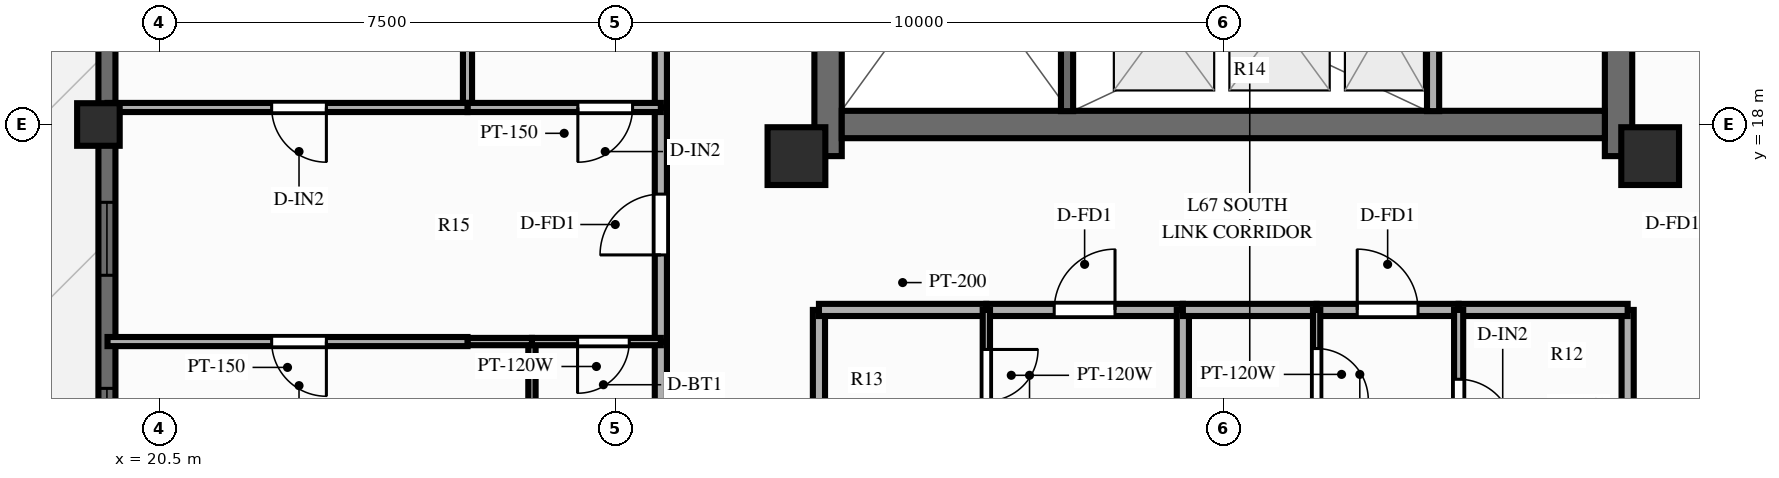
"""IFC4 building model, lengths in metres.
Left out: names, types, materials, properties, quantities, classifications, styles, units other than length and angle.
Written with IfcOpenShell. Run it as: python <this file> out.ifc"""

import sys

from ifc_helpers import new_model, si_unit, direction, frame, frame_2d, origin, origin_2d, place, context, subcontext, project, spatial, rectangle, extrude, source, transform, mapped, element, fill, save


model = new_model("IFC4")
c1 = context("Model", 3, precision=1e-05, world=origin(), true_north=direction((0.0, 1.0)))
c2 = subcontext(c1, "Body", "Model", "MODEL_VIEW")
j1 = project(units=[si_unit("LENGTHUNIT", "METRE"), si_unit("PLANEANGLEUNIT", "RADIAN")], contexts=[c1])
p1 = place(None, origin())
s1 = spatial("IfcSite", under=j1, at=p1, CompositionType="ELEMENT")
p2 = place(p1, origin())
s2 = spatial("IfcBuilding", under=s1, at=p2, CompositionType="ELEMENT")
p3 = place(p2, frame((0.0, 0.0, 216.3)))
s3 = spatial("IfcBuildingStorey", under=s2, at=p3, CompositionType="ELEMENT", Elevation=216.3)
p4 = place(p3, frame((31.5, 17.48, 0.0), z_axis=(0.0, 0.0, 1.0), x_axis=(0.0, 1.0, 0.0)))
e1 = element("IfcWall", 1, at=p4, inside=s3, PredefinedType="SHEAR", context=c2, shape_type="SweptSolid", body=[
    extrude(rectangle(XDim=19.04, YDim=0.45, at=frame_2d((9.52, 0.0))), origin(), (0.0, 0.0, 1.0), 3.9),
])
p5 = place(p4, frame((6.32, 0.0, 0.0)))
e2 = element("IfcOpeningElement", 2, at=p5, cuts=e1, PredefinedType="OPENING", context=c2, shape_type="SweptSolid", body=[
    extrude(rectangle(XDim=1.1, YDim=2.15, at=frame_2d((0.55, 1.075))), frame((0.0, 0.237, 0.0), z_axis=(0.0, -1.0, 0.0), x_axis=(1.0, 0.0, 0.0)), (0.0, 0.0, 1.0), 0.474),
])
p6 = place(p3, frame((44.5, 17.48, 0.0), z_axis=(0.0, 0.0, 1.0), x_axis=(0.0, 1.0, 0.0)))
e3 = element("IfcWall", 3, at=p6, inside=s3, PredefinedType="SHEAR", context=c2, shape_type="SweptSolid", body=[
    extrude(rectangle(XDim=19.04, YDim=0.45, at=frame_2d((9.52, 0.0))), origin(), (0.0, 0.0, 1.0), 3.9),
])
p7 = place(p6, frame((12.67, 0.0, 0.0), z_axis=(0.0, 0.0, 1.0), x_axis=(-1.0, 0.0, 0.0)))
e4 = element("IfcOpeningElement", 4, at=p7, cuts=e3, PredefinedType="OPENING", context=c2, shape_type="SweptSolid", body=[
    extrude(rectangle(XDim=1.1, YDim=2.15, at=frame_2d((0.55, 1.075))), frame((0.0, 0.237, 0.0), z_axis=(0.0, -1.0, 0.0), x_axis=(1.0, 0.0, 0.0)), (0.0, 0.0, 1.0), 0.474),
])
p8 = place(p3, frame((31.725, 18.0, 0.0), z_axis=(0.0, 0.0, 1.0), x_axis=(1.0, 0.0, 0.0)))
e5 = element("IfcWall", 5, at=p8, inside=s3, PredefinedType="SHEAR", context=c2, shape_type="SweptSolid", body=[
    extrude(rectangle(XDim=12.55, YDim=0.45, at=frame_2d((6.275, 0.0))), origin(), (0.0, 0.0, 1.0), 3.9),
])
m1 = source(origin(), c2, "Body", "SweptSolid", [
    extrude(rectangle(XDim=0.95, YDim=0.95, at=origin_2d()), origin(), (0.0, 0.0, 1.0), 3.9),
])
for number, where, z_axis, x_axis in (
    (6, (30.98, 17.48, 0.0), (0.0, 0.0, 1.0), (1.0, 0.0, 0.0)),
    (7, (45.02, 17.48, 0.0), (0.0, 0.0, 1.0), (1.0, 0.0, 0.0)),
):
    element("IfcColumn", number, at=place(p3, frame(where, z_axis=z_axis, x_axis=x_axis)), inside=s3, PredefinedType="COLUMN", context=c2, shape_type="MappedRepresentation", body=[
        mapped(m1, transform((0.0, 0.0, 0.0), scale=1.0)),
    ])
m2 = source(origin(), c2, "Body", "SweptSolid", [
    extrude(rectangle(XDim=0.7, YDim=0.7, at=origin_2d()), origin(), (0.0, 0.0, 1.0), 3.9),
])
p9 = place(p3, frame((19.5, 18.0, 0.0), z_axis=(0.0, 0.0, 1.0), x_axis=(1.0, 0.0, 0.0)))
e8 = element("IfcColumn", 8, at=p9, inside=s3, PredefinedType="COLUMN", context=c2, shape_type="MappedRepresentation", body=[
    mapped(m2, transform((0.0, 0.0, 0.0), scale=1.0)),
])
p10 = place(p3, frame((19.64, 11.5, 0.0), z_axis=(0.0, 0.0, 1.0), x_axis=(0.0, 1.0, 0.0)))
e9 = element("IfcWall", 9, at=p10, inside=s3, PredefinedType="SOLIDWALL", context=c2, shape_type="SweptSolid", body=[
    extrude(rectangle(XDim=31.0, YDim=0.28, at=frame_2d((15.5, 0.0))), origin(), (0.0, 0.0, 1.0), 2.44),
])
p11 = place(p10, frame((0.96, 0.0, 0.25)))
e10 = element("IfcOpeningElement", 10, at=p11, cuts=e9, PredefinedType="OPENING", context=c2, shape_type="SweptSolid", body=[
    extrude(rectangle(XDim=1.2, YDim=1.5, at=frame_2d((0.6, 0.75))), frame((0.0, 0.152, 0.0), z_axis=(0.0, -1.0, 0.0), x_axis=(1.0, 0.0, 0.0)), (0.0, 0.0, 1.0), 0.304),
])
p12 = place(p10, frame((4.02, 0.0, 0.25)))
e11 = element("IfcOpeningElement", 11, at=p12, cuts=e9, PredefinedType="OPENING", context=c2, shape_type="SweptSolid", body=[
    extrude(rectangle(XDim=1.2, YDim=1.5, at=frame_2d((0.6, 0.75))), frame((0.0, 0.152, 0.0), z_axis=(0.0, -1.0, 0.0), x_axis=(1.0, 0.0, 0.0)), (0.0, 0.0, 1.0), 0.304),
])
p13 = place(p10, frame((8.089, 0.0, 0.25)))
e12 = element("IfcOpeningElement", 12, at=p13, cuts=e9, PredefinedType="OPENING", context=c2, shape_type="SweptSolid", body=[
    extrude(rectangle(XDim=1.2, YDim=1.5, at=frame_2d((0.6, 0.75))), frame((0.0, 0.152, 0.0), z_axis=(0.0, -1.0, 0.0), x_axis=(1.0, 0.0, 0.0)), (0.0, 0.0, 1.0), 0.304),
])
p14 = place(p10, frame((11.373, 0.0, 0.25)))
e13 = element("IfcOpeningElement", 13, at=p14, cuts=e9, PredefinedType="OPENING", context=c2, shape_type="SweptSolid", body=[
    extrude(rectangle(XDim=1.2, YDim=1.5, at=frame_2d((0.6, 0.75))), frame((0.0, 0.152, 0.0), z_axis=(0.0, -1.0, 0.0), x_axis=(1.0, 0.0, 0.0)), (0.0, 0.0, 1.0), 0.304),
])
p15 = place(p10, frame((14.307, 0.0, 0.0)))
e14 = element("IfcOpeningElement", 14, at=p15, cuts=e9, PredefinedType="OPENING", context=c2, shape_type="SweptSolid", body=[
    extrude(rectangle(XDim=1.6, YDim=2.15, at=frame_2d((0.8, 1.075))), frame((0.0, 0.152, 0.0), z_axis=(0.0, -1.0, 0.0), x_axis=(1.0, 0.0, 0.0)), (0.0, 0.0, 1.0), 0.304),
])
p16 = place(p10, frame((18.188, 0.0, 0.25)))
e15 = element("IfcOpeningElement", 15, at=p16, cuts=e9, PredefinedType="OPENING", context=c2, shape_type="SweptSolid", body=[
    extrude(rectangle(XDim=1.2, YDim=1.5, at=frame_2d((0.6, 0.75))), frame((0.0, 0.152, 0.0), z_axis=(0.0, -1.0, 0.0), x_axis=(1.0, 0.0, 0.0)), (0.0, 0.0, 1.0), 0.304),
])
p17 = place(p10, frame((21.484, 0.0, 0.25)))
e16 = element("IfcOpeningElement", 16, at=p17, cuts=e9, PredefinedType="OPENING", context=c2, shape_type="SweptSolid", body=[
    extrude(rectangle(XDim=1.2, YDim=1.5, at=frame_2d((0.6, 0.75))), frame((0.0, 0.152, 0.0), z_axis=(0.0, -1.0, 0.0), x_axis=(1.0, 0.0, 0.0)), (0.0, 0.0, 1.0), 0.304),
])
p18 = place(p10, frame((25.234, 0.0, 0.25)))
e17 = element("IfcOpeningElement", 17, at=p18, cuts=e9, PredefinedType="OPENING", context=c2, shape_type="SweptSolid", body=[
    extrude(rectangle(XDim=1.2, YDim=1.5, at=frame_2d((0.6, 0.75))), frame((0.0, 0.152, 0.0), z_axis=(0.0, -1.0, 0.0), x_axis=(1.0, 0.0, 0.0)), (0.0, 0.0, 1.0), 0.304),
])
p19 = place(p10, frame((28.294, 0.0, 0.25)))
e18 = element("IfcOpeningElement", 18, at=p19, cuts=e9, PredefinedType="OPENING", context=c2, shape_type="SweptSolid", body=[
    extrude(rectangle(XDim=1.2, YDim=1.5, at=frame_2d((0.6, 0.75))), frame((0.0, 0.152, 0.0), z_axis=(0.0, -1.0, 0.0), x_axis=(1.0, 0.0, 0.0)), (0.0, 0.0, 1.0), 0.304),
])
p20 = place(p3, frame((41.45, 18.22, 0.0), z_axis=(0.0, 0.0, 1.0), x_axis=(0.0, 1.0, 0.0)))
e19 = element("IfcWall", 19, at=p20, inside=s3, PredefinedType="PARTITIONING", context=c2, shape_type="SweptSolid", body=[
    extrude(rectangle(XDim=2.86, YDim=0.2, at=frame_2d((1.43, 0.0))), origin(), (0.0, 0.0, 1.0), 3.56),
])
p21 = place(p3, frame((35.43, 18.22, 0.0), z_axis=(0.0, 0.0, 1.0), x_axis=(0.0, 1.0, 0.0)))
e20 = element("IfcWall", 20, at=p21, inside=s3, PredefinedType="SOLIDWALL", context=c2, shape_type="SweptSolid", body=[
    extrude(rectangle(XDim=7.22, YDim=0.2, at=frame_2d((3.61, 0.0))), origin(), (0.0, 0.0, 1.0), 3.69),
])
p22 = place(p21, frame((6.68, 0.0, 0.0), z_axis=(0.0, 0.0, 1.0), x_axis=(-1.0, 0.0, 0.0)))
e21 = element("IfcOpeningElement", 21, at=p22, cuts=e20, PredefinedType="OPENING", context=c2, shape_type="SweptSolid", body=[
    extrude(rectangle(XDim=1.1, YDim=2.15, at=frame_2d((0.55, 1.075))), frame((0.0, 0.112, 0.0), z_axis=(0.0, -1.0, 0.0), x_axis=(1.0, 0.0, 0.0)), (0.0, 0.0, 1.0), 0.224),
])
for number, where, z_axis, x_axis in (
    (22, (31.35, 14.95, 0.0), (0.0, 0.0, 1.0), (0.0, -1.0, 0.0)),
    (23, (44.65, 14.95, 0.0), (0.0, 0.0, 1.0), (0.0, -1.0, 0.0)),
):
    element("IfcWall", number, at=place(p3, frame(where, z_axis=z_axis, x_axis=x_axis)), inside=s3, PredefinedType="PARTITIONING", context=c2, shape_type="SweptSolid", body=[
        extrude(rectangle(XDim=8.8, YDim=0.2, at=frame_2d((4.4, 0.0))), origin(), (0.0, 0.0, 1.0), 2.44),
    ])
p23 = place(p3, frame((31.35, 14.95, 0.0), z_axis=(0.0, 0.0, 1.0), x_axis=(1.0, 0.0, 0.0)))
e24 = element("IfcWall", 24, at=p23, inside=s3, PredefinedType="PARTITIONING", context=c2, shape_type="SweptSolid", body=[
    extrude(rectangle(XDim=2.753, YDim=0.2, at=frame_2d((1.376, 0.0))), origin(), (0.0, 0.0, 1.0), 3.56),
])
p24 = place(p3, frame((34.103, 14.95, 0.0), z_axis=(0.0, 0.0, 1.0), x_axis=(1.0, 0.0, 0.0)))
e25 = element("IfcWall", 25, at=p24, inside=s3, PredefinedType="PARTITIONING", context=c2, shape_type="SweptSolid", body=[
    extrude(rectangle(XDim=3.232, YDim=0.2, at=frame_2d((1.616, 0.0))), origin(), (0.0, 0.0, 1.0), 3.56),
])
p25 = place(p24, frame((1.116, 0.0, 0.0)))
e26 = element("IfcOpeningElement", 26, at=p25, cuts=e25, PredefinedType="OPENING", context=c2, shape_type="SweptSolid", body=[
    extrude(rectangle(XDim=1.0, YDim=2.15, at=frame_2d((0.5, 1.075))), frame((0.0, 0.112, 0.0), z_axis=(0.0, -1.0, 0.0), x_axis=(1.0, 0.0, 0.0)), (0.0, 0.0, 1.0), 0.224),
])
p26 = place(p3, frame((34.103, 14.95, 0.0), z_axis=(0.0, 0.0, 1.0), x_axis=(0.0, -1.0, 0.0)))
e27 = element("IfcWall", 27, at=p26, inside=s3, PredefinedType="PARTITIONING", context=c2, shape_type="SweptSolid", body=[
    extrude(rectangle(XDim=2.15, YDim=0.12, at=frame_2d((1.075, 0.0))), origin(), (0.0, 0.0, 1.0), 3.56),
])
p27 = place(p26, frame((0.65, 0.0, 0.0)))
e28 = element("IfcOpeningElement", 28, at=p27, cuts=e27, PredefinedType="OPENING", context=c2, shape_type="SweptSolid", body=[
    extrude(rectangle(XDim=0.85, YDim=2.05, at=frame_2d((0.425, 1.025))), frame((0.0, 0.072, 0.0), z_axis=(0.0, -1.0, 0.0), x_axis=(1.0, 0.0, 0.0)), (0.0, 0.0, 1.0), 0.144),
])
p28 = place(p3, frame((37.335, 14.95, 0.0), z_axis=(0.0, 0.0, 1.0), x_axis=(0.0, -1.0, 0.0)))
e29 = element("IfcWall", 29, at=p28, inside=s3, PredefinedType="PARTITIONING", context=c2, shape_type="SweptSolid", body=[
    extrude(rectangle(XDim=8.8, YDim=0.2, at=frame_2d((4.4, 0.0))), origin(), (0.0, 0.0, 1.0), 3.56),
])
p29 = place(p3, frame((37.335, 14.95, 0.0), z_axis=(0.0, 0.0, 1.0), x_axis=(1.0, 0.0, 0.0)))
e30 = element("IfcWall", 30, at=p29, inside=s3, PredefinedType="PARTITIONING", context=c2, shape_type="SweptSolid", body=[
    extrude(rectangle(XDim=2.2, YDim=0.2, at=frame_2d((1.1, 0.0))), origin(), (0.0, 0.0, 1.0), 3.56),
])
p30 = place(p3, frame((39.535, 14.95, 0.0), z_axis=(0.0, 0.0, 1.0), x_axis=(1.0, 0.0, 0.0)))
e31 = element("IfcWall", 31, at=p30, inside=s3, PredefinedType="PARTITIONING", context=c2, shape_type="SweptSolid", body=[
    extrude(rectangle(XDim=2.335, YDim=0.2, at=frame_2d((1.168, 0.0))), origin(), (0.0, 0.0, 1.0), 3.56),
])
p31 = place(p30, frame((0.668, 0.0, 0.0)))
e32 = element("IfcOpeningElement", 32, at=p31, cuts=e31, PredefinedType="OPENING", context=c2, shape_type="SweptSolid", body=[
    extrude(rectangle(XDim=1.0, YDim=2.15, at=frame_2d((0.5, 1.075))), frame((0.0, 0.112, 0.0), z_axis=(0.0, -1.0, 0.0), x_axis=(1.0, 0.0, 0.0)), (0.0, 0.0, 1.0), 0.224),
])
p32 = place(p3, frame((41.87, 14.95, 0.0), z_axis=(0.0, 0.0, 1.0), x_axis=(1.0, 0.0, 0.0)))
e33 = element("IfcWall", 33, at=p32, inside=s3, PredefinedType="PARTITIONING", context=c2, shape_type="SweptSolid", body=[
    extrude(rectangle(XDim=2.78, YDim=0.2, at=frame_2d((1.39, 0.0))), origin(), (0.0, 0.0, 1.0), 3.56),
])
p33 = place(p3, frame((39.535, 14.95, 0.0), z_axis=(0.0, 0.0, 1.0), x_axis=(0.0, -1.0, 0.0)))
e34 = element("IfcWall", 34, at=p33, inside=s3, PredefinedType="PARTITIONING", context=c2, shape_type="SweptSolid", body=[
    extrude(rectangle(XDim=2.12, YDim=0.12, at=frame_2d((1.06, 0.0))), origin(), (0.0, 0.0, 1.0), 3.56),
])
p34 = place(p33, frame((0.635, 0.0, 0.0)))
e35 = element("IfcOpeningElement", 35, at=p34, cuts=e34, PredefinedType="OPENING", context=c2, shape_type="SweptSolid", body=[
    extrude(rectangle(XDim=0.85, YDim=2.05, at=frame_2d((0.425, 1.025))), frame((0.0, 0.072, 0.0), z_axis=(0.0, -1.0, 0.0), x_axis=(1.0, 0.0, 0.0)), (0.0, 0.0, 1.0), 0.144),
])
p35 = place(p3, frame((41.87, 14.95, 0.0), z_axis=(0.0, 0.0, 1.0), x_axis=(0.0, -1.0, 0.0)))
e36 = element("IfcWall", 36, at=p35, inside=s3, PredefinedType="PARTITIONING", context=c2, shape_type="SweptSolid", body=[
    extrude(rectangle(XDim=3.18, YDim=0.15, at=frame_2d((1.59, 0.0))), origin(), (0.0, 0.0, 1.0), 3.56),
])
p36 = place(p35, frame((1.14, 0.0, 0.0)))
e37 = element("IfcOpeningElement", 37, at=p36, cuts=e36, PredefinedType="OPENING", context=c2, shape_type="SweptSolid", body=[
    extrude(rectangle(XDim=0.9, YDim=2.1, at=frame_2d((0.45, 1.05))), frame((0.0, 0.087, 0.0), z_axis=(0.0, -1.0, 0.0), x_axis=(1.0, 0.0, 0.0)), (0.0, 0.0, 1.0), 0.174),
])
p37 = place(p3, frame((28.75, 11.68, 0.0), z_axis=(0.0, 0.0, 1.0), x_axis=(0.0, 1.0, 0.0)))
e38 = element("IfcWall", 38, at=p37, inside=s3, PredefinedType="PARTITIONING", context=c2, shape_type="SweptSolid", body=[
    extrude(rectangle(XDim=2.75, YDim=0.2, at=frame_2d((1.375, 0.0))), origin(), (0.0, 0.0, 1.0), 3.56),
])
p38 = place(p3, frame((28.75, 14.43, 0.0), z_axis=(0.0, 0.0, 1.0), x_axis=(0.0, 1.0, 0.0)))
e39 = element("IfcWall", 39, at=p38, inside=s3, PredefinedType="PARTITIONING", context=c2, shape_type="SweptSolid", body=[
    extrude(rectangle(XDim=3.85, YDim=0.2, at=frame_2d((1.925, 0.0))), origin(), (0.0, 0.0, 1.0), 3.56),
])
p39 = place(p38, frame((1.425, 0.0, 0.0)))
e40 = element("IfcOpeningElement", 40, at=p39, cuts=e39, PredefinedType="OPENING", context=c2, shape_type="SweptSolid", body=[
    extrude(rectangle(XDim=1.0, YDim=2.15, at=frame_2d((0.5, 1.075))), frame((0.0, 0.112, 0.0), z_axis=(0.0, -1.0, 0.0), x_axis=(1.0, 0.0, 0.0)), (0.0, 0.0, 1.0), 0.224),
])
p40 = place(p3, frame((28.75, 18.28, 0.0), z_axis=(0.0, 0.0, 1.0), x_axis=(0.0, 1.0, 0.0)))
e41 = element("IfcWall", 41, at=p40, inside=s3, PredefinedType="PARTITIONING", context=c2, shape_type="SweptSolid", body=[
    extrude(rectangle(XDim=3.818, YDim=0.2, at=frame_2d((1.909, 0.0))), origin(), (0.0, 0.0, 1.0), 3.56),
])
p41 = place(p3, frame((26.63, 11.68, 0.0), z_axis=(0.0, 0.0, 1.0), x_axis=(0.0, 1.0, 0.0)))
e42 = element("IfcWall", 42, at=p41, inside=s3, PredefinedType="PARTITIONING", context=c2, shape_type="SweptSolid", body=[
    extrude(rectangle(XDim=2.75, YDim=0.12, at=frame_2d((1.375, 0.0))), origin(), (0.0, 0.0, 1.0), 2.24),
])
p42 = place(p3, frame((25.57, 18.28, 0.0), z_axis=(0.0, 0.0, 1.0), x_axis=(0.0, 1.0, 0.0)))
e43 = element("IfcWall", 43, at=p42, inside=s3, PredefinedType="PARTITIONING", context=c2, shape_type="SweptSolid", body=[
    extrude(rectangle(XDim=3.818, YDim=0.15, at=frame_2d((1.909, 0.0))), origin(), (0.0, 0.0, 1.0), 3.39),
])
p43 = place(p3, frame((28.75, 14.43, 0.0), z_axis=(0.0, 0.0, 1.0), x_axis=(-1.0, 0.0, 0.0)))
e44 = element("IfcWall", 44, at=p43, inside=s3, PredefinedType="PARTITIONING", context=c2, shape_type="SweptSolid", body=[
    extrude(rectangle(XDim=2.12, YDim=0.12, at=frame_2d((1.06, 0.0))), origin(), (0.0, 0.0, 1.0), 3.56),
])
p44 = place(p43, frame((0.52, 0.0, 0.0)))
e45 = element("IfcOpeningElement", 45, at=p44, cuts=e44, PredefinedType="OPENING", context=c2, shape_type="SweptSolid", body=[
    extrude(rectangle(XDim=0.85, YDim=2.05, at=frame_2d((0.425, 1.025))), frame((0.0, 0.072, 0.0), z_axis=(0.0, -1.0, 0.0), x_axis=(1.0, 0.0, 0.0)), (0.0, 0.0, 1.0), 0.144),
])
p45 = place(p3, frame((26.63, 14.43, 0.0), z_axis=(0.0, 0.0, 1.0), x_axis=(-1.0, 0.0, 0.0)))
e46 = element("IfcWall", 46, at=p45, inside=s3, PredefinedType="PARTITIONING", context=c2, shape_type="SweptSolid", body=[
    extrude(rectangle(XDim=1.06, YDim=0.12, at=frame_2d((0.53, 0.0))), origin(), (0.0, 0.0, 1.0), 3.56),
])
p46 = place(p3, frame((25.57, 14.43, 0.0), z_axis=(0.0, 0.0, 1.0), x_axis=(-1.0, 0.0, 0.0)))
e47 = element("IfcWall", 47, at=p46, inside=s3, PredefinedType="PARTITIONING", context=c2, shape_type="SweptSolid", body=[
    extrude(rectangle(XDim=5.92, YDim=0.15, at=frame_2d((2.96, 0.0))), origin(), (0.0, 0.0, 1.0), 3.56),
])
p47 = place(p46, frame((2.321, 0.0, 0.0)))
e48 = element("IfcOpeningElement", 48, at=p47, cuts=e47, PredefinedType="OPENING", context=c2, shape_type="SweptSolid", body=[
    extrude(rectangle(XDim=0.9, YDim=2.1, at=frame_2d((0.45, 1.05))), frame((0.0, 0.087, 0.0), z_axis=(0.0, -1.0, 0.0), x_axis=(1.0, 0.0, 0.0)), (0.0, 0.0, 1.0), 0.174),
])
p48 = place(p3, frame((28.75, 18.28, 0.0), z_axis=(0.0, 0.0, 1.0), x_axis=(-1.0, 0.0, 0.0)))
e49 = element("IfcWall", 49, at=p48, inside=s3, PredefinedType="PARTITIONING", context=c2, shape_type="SweptSolid", body=[
    extrude(rectangle(XDim=3.18, YDim=0.15, at=frame_2d((1.59, 0.0))), origin(), (0.0, 0.0, 1.0), 3.56),
])
p49 = place(p48, frame((0.465, 0.0, 0.0)))
e50 = element("IfcOpeningElement", 50, at=p49, cuts=e49, PredefinedType="OPENING", context=c2, shape_type="SweptSolid", body=[
    extrude(rectangle(XDim=0.9, YDim=2.1, at=frame_2d((0.45, 1.05))), frame((0.0, 0.087, 0.0), z_axis=(0.0, -1.0, 0.0), x_axis=(1.0, 0.0, 0.0)), (0.0, 0.0, 1.0), 0.174),
])
p50 = place(p3, frame((25.57, 18.28, 0.0), z_axis=(0.0, 0.0, 1.0), x_axis=(-1.0, 0.0, 0.0)))
e51 = element("IfcWall", 51, at=p50, inside=s3, PredefinedType="PARTITIONING", context=c2, shape_type="SweptSolid", body=[
    extrude(rectangle(XDim=5.92, YDim=0.15, at=frame_2d((2.96, 0.0))), origin(), (0.0, 0.0, 1.0), 3.56),
])
p51 = place(p50, frame((2.321, 0.0, 0.0)))
e52 = element("IfcOpeningElement", 52, at=p51, cuts=e51, PredefinedType="OPENING", context=c2, shape_type="SweptSolid", body=[
    extrude(rectangle(XDim=0.9, YDim=2.1, at=frame_2d((0.45, 1.05))), frame((0.0, 0.087, 0.0), z_axis=(0.0, -1.0, 0.0), x_axis=(1.0, 0.0, 0.0)), (0.0, 0.0, 1.0), 0.174),
])
m3 = source(origin(), c2, "Body", "SweptSolid", [
    extrude(rectangle(XDim=1.2, YDim=1.5, at=frame_2d((0.6, 0.75))), frame((0.0, 0.03, 0.0), z_axis=(0.0, -1.0, 0.0), x_axis=(1.0, 0.0, 0.0)), (0.0, 0.0, 1.0), 0.06),
])
p52 = place(p11, origin())
e53 = element("IfcWindow", 53, at=p52, inside=s3, PartitioningType="SINGLE_PANEL", PredefinedType="WINDOW", context=c2, shape_type="MappedRepresentation", body=[
    mapped(m3, transform((0.0, 0.0, 0.0), scale=1.0)),
])
fill(e10, e53)
p53 = place(p12, origin())
e54 = element("IfcWindow", 54, at=p53, inside=s3, PartitioningType="SINGLE_PANEL", PredefinedType="WINDOW", context=c2, shape_type="MappedRepresentation", body=[
    mapped(m3, transform((0.0, 0.0, 0.0), scale=1.0)),
])
fill(e11, e54)
m4 = source(origin(), c2, "Body", "SweptSolid", [
    extrude(rectangle(XDim=1.0, YDim=2.15, at=frame_2d((0.5, 1.075))), frame((0.0, 0.025, 0.0), z_axis=(0.0, -1.0, 0.0), x_axis=(1.0, 0.0, 0.0)), (0.0, 0.0, 1.0), 0.05),
])
p54 = place(p25, origin())
e55 = element("IfcDoor", 55, at=p54, inside=s3, OperationType="SINGLE_SWING_RIGHT", PredefinedType="DOOR", context=c2, shape_type="MappedRepresentation", body=[
    mapped(m4, transform((0.0, 0.0, 0.0), scale=1.0)),
])
fill(e26, e55)
m5 = source(origin(), c2, "Body", "SweptSolid", [
    extrude(rectangle(XDim=0.85, YDim=2.05, at=frame_2d((0.425, 1.025))), frame((0.0, 0.025, 0.0), z_axis=(0.0, -1.0, 0.0), x_axis=(1.0, 0.0, 0.0)), (0.0, 0.0, 1.0), 0.05),
])
p55 = place(p27, origin())
e56 = element("IfcDoor", 56, at=p55, inside=s3, OperationType="SINGLE_SWING_LEFT", PredefinedType="DOOR", context=c2, shape_type="MappedRepresentation", body=[
    mapped(m5, transform((0.0, 0.0, 0.0), scale=1.0)),
])
fill(e28, e56)
p56 = place(p31, origin())
e57 = element("IfcDoor", 57, at=p56, inside=s3, OperationType="SINGLE_SWING_LEFT", PredefinedType="DOOR", context=c2, shape_type="MappedRepresentation", body=[
    mapped(m4, transform((0.0, 0.0, 0.0), scale=1.0)),
])
fill(e32, e57)
p57 = place(p34, origin())
e58 = element("IfcDoor", 58, at=p57, inside=s3, OperationType="SINGLE_SWING_RIGHT", PredefinedType="DOOR", context=c2, shape_type="MappedRepresentation", body=[
    mapped(m5, transform((0.0, 0.0, 0.0), scale=1.0)),
])
fill(e35, e58)
m6 = source(origin(), c2, "Body", "SweptSolid", [
    extrude(rectangle(XDim=0.9, YDim=2.1, at=frame_2d((0.45, 1.05))), frame((0.0, 0.025, 0.0), z_axis=(0.0, -1.0, 0.0), x_axis=(1.0, 0.0, 0.0)), (0.0, 0.0, 1.0), 0.05),
])
p58 = place(p36, origin())
e59 = element("IfcDoor", 59, at=p58, inside=s3, OperationType="SINGLE_SWING_RIGHT", PredefinedType="DOOR", context=c2, shape_type="MappedRepresentation", body=[
    mapped(m6, transform((0.0, 0.0, 0.0), scale=1.0)),
])
fill(e37, e59)
p59 = place(p39, origin())
e60 = element("IfcDoor", 60, at=p59, inside=s3, OperationType="SINGLE_SWING_LEFT", PredefinedType="DOOR", context=c2, shape_type="MappedRepresentation", body=[
    mapped(m4, transform((0.0, 0.0, 0.0), scale=1.0)),
])
fill(e40, e60)
p60 = place(p44, origin())
e61 = element("IfcDoor", 61, at=p60, inside=s3, OperationType="SINGLE_SWING_RIGHT", PredefinedType="DOOR", context=c2, shape_type="MappedRepresentation", body=[
    mapped(m5, transform((0.0, 0.0, 0.0), scale=1.0)),
])
fill(e45, e61)
p61 = place(p47, origin())
e62 = element("IfcDoor", 62, at=p61, inside=s3, OperationType="SINGLE_SWING_LEFT", PredefinedType="DOOR", context=c2, shape_type="MappedRepresentation", body=[
    mapped(m6, transform((0.0, 0.0, 0.0), scale=1.0)),
])
fill(e48, e62)
p62 = place(p49, origin())
e63 = element("IfcDoor", 63, at=p62, inside=s3, OperationType="SINGLE_SWING_RIGHT", PredefinedType="DOOR", context=c2, shape_type="MappedRepresentation", body=[
    mapped(m6, transform((0.0, 0.0, 0.0), scale=1.0)),
])
fill(e50, e63)
p63 = place(p51, origin())
e64 = element("IfcDoor", 64, at=p63, inside=s3, OperationType="SINGLE_SWING_LEFT", PredefinedType="DOOR", context=c2, shape_type="MappedRepresentation", body=[
    mapped(m6, transform((0.0, 0.0, 0.0), scale=1.0)),
])
fill(e52, e64)
save(model, sys.argv[1])
